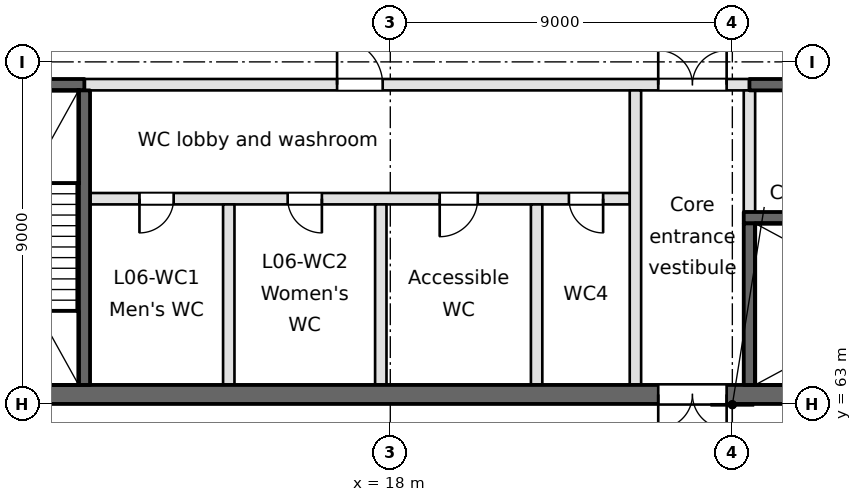
"""IFC4 building model, lengths in metres.
Left out: names, types, materials, properties, quantities, classifications, styles, units other than length and angle.
Written with IfcOpenShell. Run it as: python <this file> out.ifc"""

import sys

from ifc_helpers import new_model, si_unit, direction, frame, frame_2d, origin, place, context, subcontext, project, spatial, rectangle, extrude, element, fill, save


model = new_model("IFC4")
c1 = context("Model", 3, precision=1e-05, world=origin(), true_north=direction((0.0, 1.0)))
c2 = subcontext(c1, "Body", "Model", "MODEL_VIEW")
j1 = project(units=[si_unit("LENGTHUNIT", "METRE"), si_unit("PLANEANGLEUNIT", "RADIAN")], contexts=[c1])
p1 = place(None, origin())
s1 = spatial("IfcSite", under=j1, at=p1, CompositionType="ELEMENT")
p2 = place(p1, origin())
s2 = spatial("IfcBuilding", under=s1, at=p2, CompositionType="ELEMENT")
p3 = place(p2, frame((0.0, 0.0, 31.2)))
s3 = spatial("IfcBuildingStorey", under=s2, at=p3, CompositionType="ELEMENT", Elevation=31.2)
p4 = place(p3, frame((0.9, 63.25, -0.45), z_axis=(0.0, 0.0, 1.0), x_axis=(1.0, 0.0, 0.0)))
e1 = element("IfcWall", 1, at=p4, inside=s3, PredefinedType="SOLIDWALL", context=c2, shape_type="SweptSolid", body=[
    extrude(rectangle(XDim=35.1, YDim=0.5, at=frame_2d((17.55, 0.0))), origin(), (0.0, 0.0, 1.0), 4.65),
])
p5 = place(p4, frame((24.15, 0.0, 0.45)))
e2 = element("IfcOpeningElement", 2, at=p5, cuts=e1, PredefinedType="OPENING", context=c2, shape_type="SweptSolid", body=[
    extrude(rectangle(XDim=1.8, YDim=2.1, at=frame_2d((0.9, 1.05))), frame((0.0, 0.25, 0.0), z_axis=(0.0, -1.0, 0.0), x_axis=(1.0, 0.0, 0.0)), (0.0, 0.0, 1.0), 0.5),
])
p6 = place(p4, frame((1.55, 0.0, 0.45)))
e3 = element("IfcOpeningElement", 3, at=p6, cuts=e1, PredefinedType="OPENING", context=c2, shape_type="SweptSolid", body=[
    extrude(rectangle(XDim=1.2, YDim=2.1, at=frame_2d((0.6, 1.05))), frame((0.0, 0.25, 0.0), z_axis=(0.0, -1.0, 0.0), x_axis=(1.0, 0.0, 0.0)), (0.0, 0.0, 1.0), 0.5),
])
p7 = place(p4, frame((6.15, 0.0, 0.45)))
e4 = element("IfcOpeningElement", 4, at=p7, cuts=e1, PredefinedType="OPENING", context=c2, shape_type="SweptSolid", body=[
    extrude(rectangle(XDim=1.2, YDim=2.1, at=frame_2d((0.6, 1.05))), frame((0.0, 0.25, 0.0), z_axis=(0.0, -1.0, 0.0), x_axis=(1.0, 0.0, 0.0)), (0.0, 0.0, 1.0), 0.5),
])
p8 = place(p3, frame((27.3, 67.9, -0.45), z_axis=(0.0, 0.0, 1.0), x_axis=(1.0, 0.0, 0.0)))
e5 = element("IfcWall", 5, at=p8, inside=s3, PredefinedType="SOLIDWALL", context=c2, shape_type="SweptSolid", body=[
    extrude(rectangle(XDim=8.2, YDim=0.3, at=frame_2d((4.1, 0.0))), origin(), (0.0, 0.0, 1.0), 4.65),
])
p9 = place(p3, frame((10.1, 68.4, 0.0), z_axis=(0.0, 0.0, 1.0), x_axis=(1.0, 0.0, 0.0)))
e6 = element("IfcWall", 6, at=p9, inside=s3, PredefinedType="PARTITIONING", context=c2, shape_type="SweptSolid", body=[
    extrude(rectangle(XDim=14.2, YDim=0.3, at=frame_2d((7.1, 0.0))), origin(), (0.0, 0.0, 1.0), 4.2),
])
p10 = place(p9, frame((1.3, 0.0, 0.0)))
e7 = element("IfcOpeningElement", 7, at=p10, cuts=e6, PredefinedType="OPENING", context=c2, shape_type="SweptSolid", body=[
    extrude(rectangle(XDim=0.9, YDim=2.1, at=frame_2d((0.45, 1.05))), frame((0.0, 0.15, 0.0), z_axis=(0.0, -1.0, 0.0), x_axis=(1.0, 0.0, 0.0)), (0.0, 0.0, 1.0), 0.3),
])
p11 = place(p9, frame((5.2, 0.0, 0.0)))
e8 = element("IfcOpeningElement", 8, at=p11, cuts=e6, PredefinedType="OPENING", context=c2, shape_type="SweptSolid", body=[
    extrude(rectangle(XDim=0.9, YDim=2.1, at=frame_2d((0.45, 1.05))), frame((0.0, 0.15, 0.0), z_axis=(0.0, -1.0, 0.0), x_axis=(1.0, 0.0, 0.0)), (0.0, 0.0, 1.0), 0.3),
])
p12 = place(p9, frame((9.2, 0.0, 0.0)))
e9 = element("IfcOpeningElement", 9, at=p12, cuts=e6, PredefinedType="OPENING", context=c2, shape_type="SweptSolid", body=[
    extrude(rectangle(XDim=1.0, YDim=2.1, at=frame_2d((0.5, 1.05))), frame((0.0, 0.15, 0.0), z_axis=(0.0, -1.0, 0.0), x_axis=(1.0, 0.0, 0.0)), (0.0, 0.0, 1.0), 0.3),
])
p13 = place(p9, frame((12.6, 0.0, 0.0)))
e10 = element("IfcOpeningElement", 10, at=p13, cuts=e6, PredefinedType="OPENING", context=c2, shape_type="SweptSolid", body=[
    extrude(rectangle(XDim=0.9, YDim=2.1, at=frame_2d((0.45, 1.05))), frame((0.0, 0.15, 0.0), z_axis=(0.0, -1.0, 0.0), x_axis=(1.0, 0.0, 0.0)), (0.0, 0.0, 1.0), 0.3),
])
p14 = place(p3, frame((0.9, 71.4, -0.45), z_axis=(0.0, 0.0, 1.0), x_axis=(1.0, 0.0, 0.0)))
e11 = element("IfcWall", 11, at=p14, inside=s3, PredefinedType="SOLIDWALL", context=c2, shape_type="SweptSolid", body=[
    extrude(rectangle(XDim=9.05, YDim=0.3, at=frame_2d((4.525, 0.0))), origin(), (0.0, 0.0, 1.0), 4.65),
])
p15 = place(p3, frame((9.95, 71.4, 0.0), z_axis=(0.0, 0.0, 1.0), x_axis=(1.0, 0.0, 0.0)))
e12 = element("IfcWall", 12, at=p15, inside=s3, PredefinedType="PARTITIONING", context=c2, shape_type="SweptSolid", body=[
    extrude(rectangle(XDim=17.5, YDim=0.3, at=frame_2d((8.75, 0.0))), origin(), (0.0, 0.0, 1.0), 4.2),
])
p16 = place(p15, frame((15.1, 0.0, 0.0)))
e13 = element("IfcOpeningElement", 13, at=p16, cuts=e12, PredefinedType="OPENING", context=c2, shape_type="SweptSolid", body=[
    extrude(rectangle(XDim=1.8, YDim=2.1, at=frame_2d((0.9, 1.05))), frame((0.0, 0.15, 0.0), z_axis=(0.0, -1.0, 0.0), x_axis=(1.0, 0.0, 0.0)), (0.0, 0.0, 1.0), 0.3),
])
p17 = place(p15, frame((6.65, 0.0, 0.0)))
e14 = element("IfcOpeningElement", 14, at=p17, cuts=e12, PredefinedType="OPENING", context=c2, shape_type="SweptSolid", body=[
    extrude(rectangle(XDim=1.2, YDim=2.1, at=frame_2d((0.6, 1.05))), frame((0.0, 0.15, 0.0), z_axis=(0.0, -1.0, 0.0), x_axis=(1.0, 0.0, 0.0)), (0.0, 0.0, 1.0), 0.3),
])
p18 = place(p3, frame((27.45, 71.4, 0.0), z_axis=(0.0, 0.0, 1.0), x_axis=(1.0, 0.0, 0.0)))
e15 = element("IfcWall", 15, at=p18, inside=s3, PredefinedType="SOLIDWALL", context=c2, shape_type="SweptSolid", body=[
    extrude(rectangle(XDim=8.05, YDim=0.3, at=frame_2d((4.025, 0.0))), origin(), (0.0, 0.0, 1.0), 4.2),
])
p19 = place(p18, frame((3.65, 0.0, 0.0)))
e16 = element("IfcOpeningElement", 16, at=p19, cuts=e15, PredefinedType="OPENING", context=c2, shape_type="SweptSolid", body=[
    extrude(rectangle(XDim=1.0, YDim=2.1, at=frame_2d((0.5, 1.05))), frame((0.0, 0.15, 0.0), z_axis=(0.0, -1.0, 0.0), x_axis=(1.0, 0.0, 0.0)), (0.0, 0.0, 1.0), 0.3),
])
p20 = place(p3, frame((9.95, 63.5, -0.45), z_axis=(0.0, 0.0, 1.0), x_axis=(0.0, 1.0, 0.0)))
e17 = element("IfcWall", 17, at=p20, inside=s3, PredefinedType="SOLIDWALL", context=c2, shape_type="SweptSolid", body=[
    extrude(rectangle(XDim=7.75, YDim=0.3, at=frame_2d((3.875, 0.0))), origin(), (0.0, 0.0, 1.0), 4.65),
])
for number, where, z_axis, x_axis in (
    (18, (13.75, 63.5, 0.0), (0.0, 0.0, 1.0), (0.0, 1.0, 0.0)),
    (19, (17.75, 63.5, 0.0), (0.0, 0.0, 1.0), (0.0, 1.0, 0.0)),
    (20, (21.85, 63.5, 0.0), (0.0, 0.0, 1.0), (0.0, 1.0, 0.0)),
):
    element("IfcWall", number, at=place(p3, frame(where, z_axis=z_axis, x_axis=x_axis)), inside=s3, PredefinedType="PARTITIONING", context=c2, shape_type="SweptSolid", body=[
        extrude(rectangle(XDim=4.75, YDim=0.3, at=frame_2d((2.375, 0.0))), origin(), (0.0, 0.0, 1.0), 4.2),
    ])
p21 = place(p3, frame((24.45, 63.5, 0.0), z_axis=(0.0, 0.0, 1.0), x_axis=(0.0, 1.0, 0.0)))
e21 = element("IfcWall", 21, at=p21, inside=s3, PredefinedType="PARTITIONING", context=c2, shape_type="SweptSolid", body=[
    extrude(rectangle(XDim=7.75, YDim=0.3, at=frame_2d((3.875, 0.0))), origin(), (0.0, 0.0, 1.0), 4.2),
])
p22 = place(p3, frame((27.45, 63.5, -0.45), z_axis=(0.0, 0.0, 1.0), x_axis=(0.0, 1.0, 0.0)))
e22 = element("IfcWall", 22, at=p22, inside=s3, PredefinedType="SOLIDWALL", context=c2, shape_type="SweptSolid", body=[
    extrude(rectangle(XDim=4.25, YDim=0.3, at=frame_2d((2.125, 0.0))), origin(), (0.0, 0.0, 1.0), 4.65),
])
p23 = place(p3, frame((27.45, 68.05, 0.0), z_axis=(0.0, 0.0, 1.0), x_axis=(0.0, 1.0, 0.0)))
e23 = element("IfcWall", 23, at=p23, inside=s3, PredefinedType="PARTITIONING", context=c2, shape_type="SweptSolid", body=[
    extrude(rectangle(XDim=3.2, YDim=0.3, at=frame_2d((1.6, 0.0))), origin(), (0.0, 0.0, 1.0), 4.2),
])
p24 = place(p5, frame((1.8, 0.0, 0.0), z_axis=(0.0, 0.0, 1.0), x_axis=(-1.0, 0.0, 0.0)))
e24 = element("IfcDoor", 24, at=p24, inside=s3, OperationType="DOUBLE_DOOR_SINGLE_SWING", PredefinedType="DOOR", context=c2, shape_type="SweptSolid", body=[
    extrude(rectangle(XDim=1.8, YDim=2.1, at=frame_2d((0.9, 1.05))), frame((0.0, 0.025, 0.0), z_axis=(0.0, -1.0, 0.0), x_axis=(1.0, 0.0, 0.0)), (0.0, 0.0, 1.0), 0.05),
])
fill(e2, e24)
p25 = place(p16, origin())
e25 = element("IfcDoor", 25, at=p25, inside=s3, OperationType="DOUBLE_DOOR_SINGLE_SWING", PredefinedType="DOOR", context=c2, shape_type="SweptSolid", body=[
    extrude(rectangle(XDim=1.8, YDim=2.1, at=frame_2d((0.9, 1.05))), frame((0.0, 0.025, 0.0), z_axis=(0.0, -1.0, 0.0), x_axis=(1.0, 0.0, 0.0)), (0.0, 0.0, 1.0), 0.05),
])
fill(e13, e25)
p26 = place(p10, frame((0.9, 0.0, 0.0), z_axis=(0.0, 0.0, 1.0), x_axis=(-1.0, 0.0, 0.0)))
e26 = element("IfcDoor", 26, at=p26, inside=s3, OperationType="SINGLE_SWING_RIGHT", PredefinedType="DOOR", context=c2, shape_type="SweptSolid", body=[
    extrude(rectangle(XDim=0.9, YDim=2.1, at=frame_2d((0.45, 1.05))), frame((0.0, 0.025, 0.0), z_axis=(0.0, -1.0, 0.0), x_axis=(1.0, 0.0, 0.0)), (0.0, 0.0, 1.0), 0.05),
])
fill(e7, e26)
p27 = place(p11, frame((0.9, 0.0, 0.0), z_axis=(0.0, 0.0, 1.0), x_axis=(-1.0, 0.0, 0.0)))
e27 = element("IfcDoor", 27, at=p27, inside=s3, OperationType="SINGLE_SWING_LEFT", PredefinedType="DOOR", context=c2, shape_type="SweptSolid", body=[
    extrude(rectangle(XDim=0.9, YDim=2.1, at=frame_2d((0.45, 1.05))), frame((0.0, 0.025, 0.0), z_axis=(0.0, -1.0, 0.0), x_axis=(1.0, 0.0, 0.0)), (0.0, 0.0, 1.0), 0.05),
])
fill(e8, e27)
p28 = place(p12, frame((1.0, 0.0, 0.0), z_axis=(0.0, 0.0, 1.0), x_axis=(-1.0, 0.0, 0.0)))
e28 = element("IfcDoor", 28, at=p28, inside=s3, OperationType="SINGLE_SWING_RIGHT", PredefinedType="DOOR", context=c2, shape_type="SweptSolid", body=[
    extrude(rectangle(XDim=1.0, YDim=2.1, at=frame_2d((0.5, 1.05))), frame((0.0, 0.025, 0.0), z_axis=(0.0, -1.0, 0.0), x_axis=(1.0, 0.0, 0.0)), (0.0, 0.0, 1.0), 0.05),
])
fill(e9, e28)
p29 = place(p13, frame((0.9, 0.0, 0.0), z_axis=(0.0, 0.0, 1.0), x_axis=(-1.0, 0.0, 0.0)))
e29 = element("IfcDoor", 29, at=p29, inside=s3, OperationType="SINGLE_SWING_LEFT", PredefinedType="DOOR", context=c2, shape_type="SweptSolid", body=[
    extrude(rectangle(XDim=0.9, YDim=2.1, at=frame_2d((0.45, 1.05))), frame((0.0, 0.025, 0.0), z_axis=(0.0, -1.0, 0.0), x_axis=(1.0, 0.0, 0.0)), (0.0, 0.0, 1.0), 0.05),
])
fill(e10, e29)
p30 = place(p17, origin())
e30 = element("IfcDoor", 30, at=p30, inside=s3, OperationType="SINGLE_SWING_LEFT", PredefinedType="DOOR", context=c2, shape_type="SweptSolid", body=[
    extrude(rectangle(XDim=1.2, YDim=2.1, at=frame_2d((0.6, 1.05))), frame((0.0, 0.025, 0.0), z_axis=(0.0, -1.0, 0.0), x_axis=(1.0, 0.0, 0.0)), (0.0, 0.0, 1.0), 0.05),
])
fill(e14, e30)
save(model, sys.argv[1])
